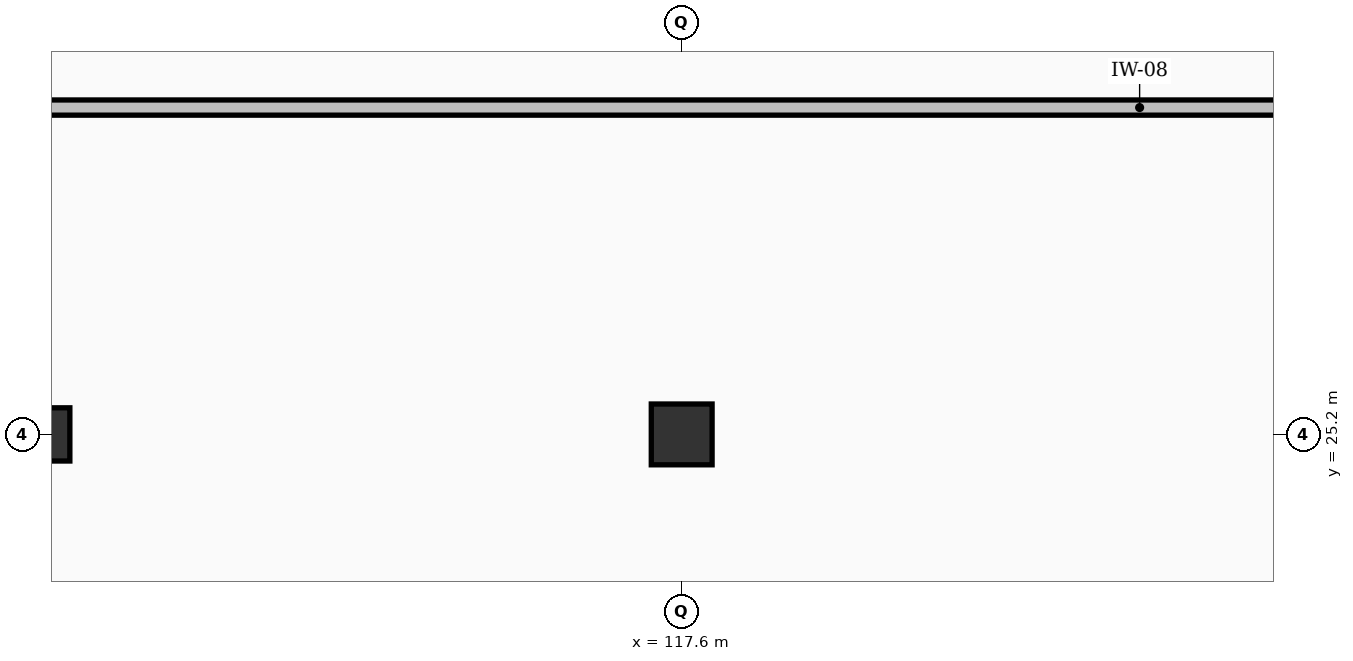
"""IFC4 building model, lengths in metres.
Left out: names, types, materials, properties, quantities, classifications, styles, units other than length and angle.
Written with IfcOpenShell. Run it as: python <this file> out.ifc"""

import sys

from ifc_helpers import new_model, si_unit, direction, frame, frame_2d, origin, origin_2d, place, context, subcontext, project, spatial, rectangle, extrude, element, save


model = new_model("IFC4")
c1 = context("Model", 3, precision=1e-05, world=origin(), true_north=direction((0.0, 1.0)))
c2 = subcontext(c1, "Body", "Model", "MODEL_VIEW")
j1 = project(units=[si_unit("LENGTHUNIT", "METRE"), si_unit("PLANEANGLEUNIT", "RADIAN")], contexts=[c1])
p1 = place(None, origin())
s1 = spatial("IfcSite", under=j1, at=p1, CompositionType="ELEMENT")
p2 = place(p1, origin())
s2 = spatial("IfcBuilding", under=s1, at=p2, CompositionType="ELEMENT")
p3 = place(p2, frame((0.0, 0.0, -4.2)))
s3 = spatial("IfcBuildingStorey", under=s2, at=p3, CompositionType="ELEMENT", Elevation=-4.2)
p4 = place(p3, frame((109.2, 25.2, 0.0), z_axis=(0.0, 0.0, 1.0), x_axis=(1.0, 0.0, 0.0)))
e1 = element("IfcColumn", 1, at=p4, inside=s3, PredefinedType="COLUMN", context=c2, shape_type="SweptSolid", body=[
    extrude(rectangle(XDim=0.7, YDim=0.7, at=origin_2d()), origin(), (0.0, 0.0, 1.0), 4.2),
])
p5 = place(p3, frame((117.6, 25.2, 0.0), z_axis=(0.0, 0.0, 1.0), x_axis=(1.0, 0.0, 0.0)))
e2 = element("IfcColumn", 2, at=p5, inside=s3, PredefinedType="COLUMN", context=c2, shape_type="SweptSolid", body=[
    extrude(rectangle(XDim=0.8, YDim=0.8, at=origin_2d()), origin(), (0.0, 0.0, 1.0), 4.2),
])
p6 = place(p3, frame((91.8, 29.5, 0.0), z_axis=(0.0, 0.0, 1.0), x_axis=(1.0, 0.0, 0.0)))
e3 = element("IfcWall", 3, at=p6, inside=s3, PredefinedType="SOLIDWALL", context=c2, shape_type="SweptSolid", body=[
    extrude(rectangle(XDim=68.4, YDim=0.2, at=frame_2d((34.2, 0.0))), origin(), (0.0, 0.0, 1.0), 3.85),
])
p7 = place(p6, frame((14.0, 0.0, 0.0)))
e4 = element("IfcOpeningElement", 4, at=p7, cuts=e3, PredefinedType="OPENING", context=c2, shape_type="SweptSolid", body=[
    extrude(rectangle(XDim=1.65, YDim=2.25, at=frame_2d((0.825, 1.125))), frame((0.0, 0.11, 0.0), z_axis=(0.0, -1.0, 0.0), x_axis=(1.0, 0.0, 0.0)), (0.0, 0.0, 1.0), 0.22),
])
p8 = place(p6, frame((48.0, 0.0, 0.0)))
e5 = element("IfcOpeningElement", 5, at=p8, cuts=e3, PredefinedType="OPENING", context=c2, shape_type="SweptSolid", body=[
    extrude(rectangle(XDim=1.65, YDim=2.25, at=frame_2d((0.825, 1.125))), frame((0.0, 0.11, 0.0), z_axis=(0.0, -1.0, 0.0), x_axis=(1.0, 0.0, 0.0)), (0.0, 0.0, 1.0), 0.22),
])
save(model, sys.argv[1])
